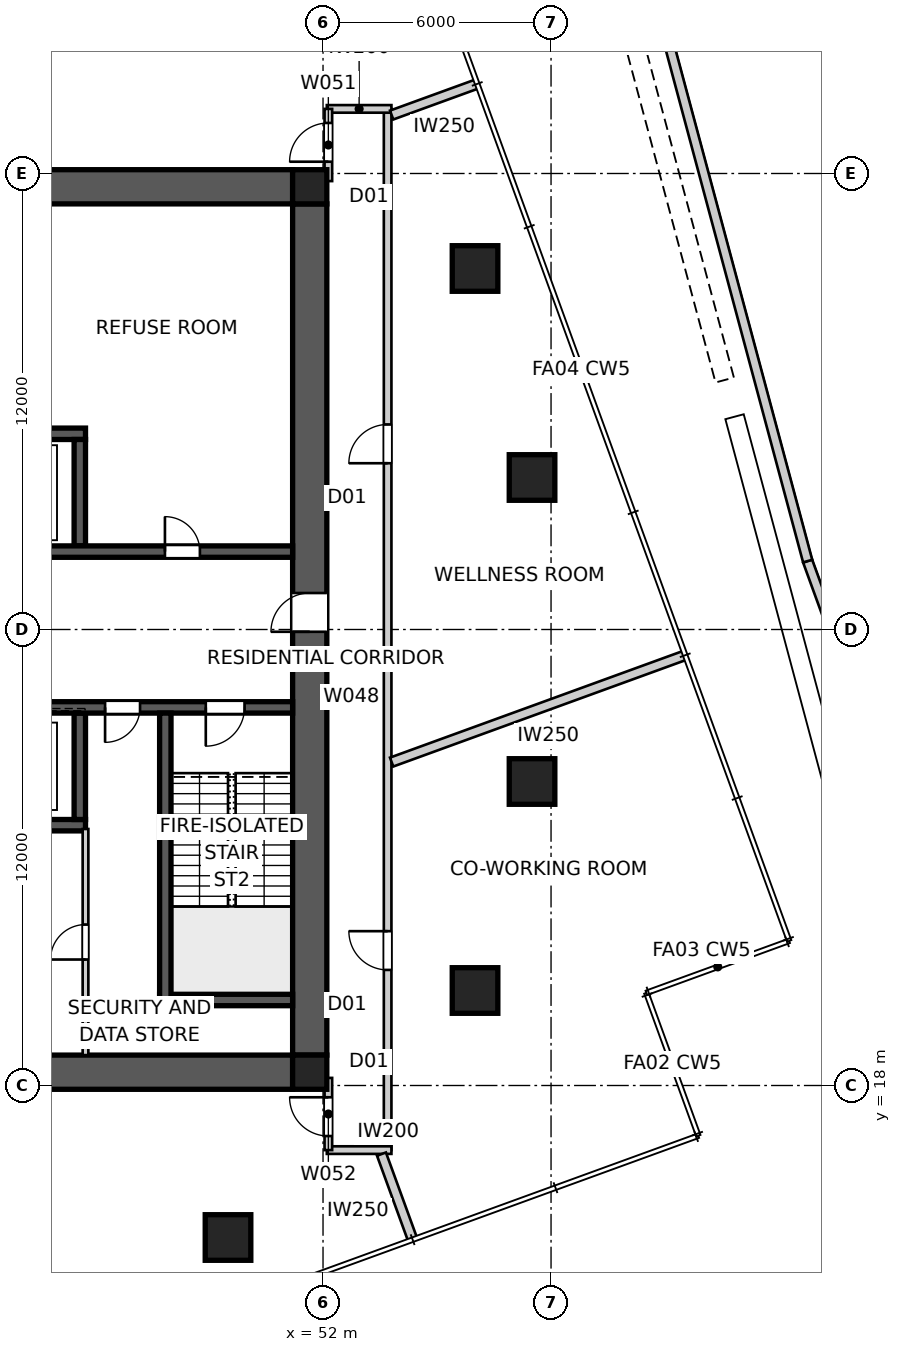
"""IFC4 building model, lengths in metres.
Left out: names, types, materials, properties, quantities, classifications, styles, units other than length and angle.
Written with IfcOpenShell. Run it as: python <this file> out.ifc"""

import sys

from ifc_helpers import new_model, si_unit, direction, frame, frame_2d, origin, origin_2d, place, context, subcontext, project, spatial, polyline, rectangle, outline, extrude, element, fill, save


model = new_model("IFC4")
c1 = context("Model", 3, precision=1e-05, world=origin(), true_north=direction((0.0, 1.0)))
c2 = subcontext(c1, "Body", "Model", "MODEL_VIEW")
j1 = project(units=[si_unit("LENGTHUNIT", "METRE"), si_unit("PLANEANGLEUNIT", "RADIAN")], contexts=[c1])
p1 = place(None, origin())
s1 = spatial("IfcSite", under=j1, at=p1, CompositionType="ELEMENT")
p2 = place(p1, origin())
s2 = spatial("IfcBuilding", under=s1, at=p2, CompositionType="ELEMENT")
p3 = place(p2, frame((0.0, 0.0, 138.8)))
s3 = spatial("IfcBuildingStorey", under=s2, at=p3, CompositionType="ELEMENT", Elevation=138.8)
for number, where, z_axis, x_axis in (
    (1, (28.8, 41.65, 0.0), (0.0, 0.0, 1.0), (1.0, 0.0, 0.0)),
    (2, (51.2, 18.35, 0.0), (0.0, 0.0, 1.0), (-1.0, 0.0, 0.0)),
):
    element("IfcWall", number, at=place(p3, frame(where, z_axis=z_axis, x_axis=x_axis)), inside=s3, PredefinedType="SHEAR", context=c2, shape_type="SweptSolid", body=[
        extrude(outline(polyline([(0.0, -0.45), (22.4, -0.45), (22.4, -0.025), (22.85, -0.025), (22.85, 0.025), (22.4, 0.025), (22.4, 0.45), (0.0, 0.45), (0.0, 0.025), (-0.45, 0.025), (-0.45, -0.025), (0.0, -0.025), (0.0, -0.45)])), origin(), (0.0, 0.0, 1.0), 5.0),
    ])
p4 = place(p3, frame((51.65, 18.8, 0.0), z_axis=(0.0, 0.0, 1.0), x_axis=(0.0, 1.0, 0.0)))
e3 = element("IfcWall", 3, at=p4, inside=s3, PredefinedType="SHEAR", context=c2, shape_type="SweptSolid", body=[
    extrude(outline(polyline([(0.0, -0.45), (22.4, -0.45), (22.4, -0.025), (22.85, -0.025), (22.85, 0.025), (22.4, 0.025), (22.4, 0.45), (0.0, 0.45), (0.0, 0.025), (-0.45, 0.025), (-0.45, -0.025), (0.0, -0.025), (0.0, -0.45)])), origin(), (0.0, 0.0, 1.0), 5.0),
])
p5 = place(p4, frame((11.14, 0.0, 0.0)))
e4 = element("IfcOpeningElement", 4, at=p5, cuts=e3, PredefinedType="OPENING", context=c2, shape_type="SweptSolid", body=[
    extrude(rectangle(XDim=1.02, YDim=2.4, at=frame_2d((0.51, 1.2))), frame((0.0, 0.46, 0.0), z_axis=(0.0, -1.0, 0.0), x_axis=(1.0, 0.0, 0.0)), (0.0, 0.0, 1.0), 0.92),
])
p6 = place(p3, frame((28.8, 32.05, 0.0), z_axis=(0.0, 0.0, 1.0), x_axis=(1.0, 0.0, 0.0)))
e5 = element("IfcWall", 5, at=p6, inside=s3, PredefinedType="SHEAR", context=c2, shape_type="SweptSolid", body=[
    extrude(rectangle(XDim=22.4, YDim=0.3, at=frame_2d((11.2, 0.0))), origin(), (0.0, 0.0, 1.0), 5.0),
])
p7 = place(p6, frame((19.04, 0.0, 0.0)))
e6 = element("IfcOpeningElement", 6, at=p7, cuts=e5, PredefinedType="OPENING", context=c2, shape_type="SweptSolid", body=[
    extrude(rectangle(XDim=0.92, YDim=2.1, at=frame_2d((0.46, 1.05))), frame((0.0, 0.16, 0.0), z_axis=(0.0, -1.0, 0.0), x_axis=(1.0, 0.0, 0.0)), (0.0, 0.0, 1.0), 0.32),
])
p8 = place(p6, frame((1.265, 0.0, 0.0)))
e7 = element("IfcOpeningElement", 7, at=p8, cuts=e5, PredefinedType="OPENING", context=c2, shape_type="SweptSolid", body=[
    extrude(rectangle(XDim=1.02, YDim=2.1, at=frame_2d((0.51, 1.05))), frame((0.0, 0.16, 0.0), z_axis=(0.0, -1.0, 0.0), x_axis=(1.0, 0.0, 0.0)), (0.0, 0.0, 1.0), 0.32),
])
p9 = place(p6, frame((4.015, 0.0, 0.0)))
e8 = element("IfcOpeningElement", 8, at=p9, cuts=e5, PredefinedType="OPENING", context=c2, shape_type="SweptSolid", body=[
    extrude(rectangle(XDim=0.92, YDim=2.1, at=frame_2d((0.46, 1.05))), frame((0.0, 0.16, 0.0), z_axis=(0.0, -1.0, 0.0), x_axis=(1.0, 0.0, 0.0)), (0.0, 0.0, 1.0), 0.32),
])
p10 = place(p6, frame((6.45, 0.0, 0.0)))
e9 = element("IfcOpeningElement", 9, at=p10, cuts=e5, PredefinedType="OPENING", context=c2, shape_type="SweptSolid", body=[
    extrude(rectangle(XDim=1.1, YDim=2.1, at=frame_2d((0.55, 1.05))), frame((0.0, 0.16, 0.0), z_axis=(0.0, -1.0, 0.0), x_axis=(1.0, 0.0, 0.0)), (0.0, 0.0, 1.0), 0.32),
])
p11 = place(p6, frame((9.25, 0.0, 0.0)))
e10 = element("IfcOpeningElement", 10, at=p11, cuts=e5, PredefinedType="OPENING", context=c2, shape_type="SweptSolid", body=[
    extrude(rectangle(XDim=1.1, YDim=2.1, at=frame_2d((0.55, 1.05))), frame((0.0, 0.16, 0.0), z_axis=(0.0, -1.0, 0.0), x_axis=(1.0, 0.0, 0.0)), (0.0, 0.0, 1.0), 0.32),
])
p12 = place(p6, frame((12.05, 0.0, 0.0)))
e11 = element("IfcOpeningElement", 11, at=p12, cuts=e5, PredefinedType="OPENING", context=c2, shape_type="SweptSolid", body=[
    extrude(rectangle(XDim=1.1, YDim=2.1, at=frame_2d((0.55, 1.05))), frame((0.0, 0.16, 0.0), z_axis=(0.0, -1.0, 0.0), x_axis=(1.0, 0.0, 0.0)), (0.0, 0.0, 1.0), 0.32),
])
p13 = place(p6, frame((14.85, 0.0, 0.0)))
e12 = element("IfcOpeningElement", 12, at=p13, cuts=e5, PredefinedType="OPENING", context=c2, shape_type="SweptSolid", body=[
    extrude(rectangle(XDim=1.1, YDim=2.1, at=frame_2d((0.55, 1.05))), frame((0.0, 0.16, 0.0), z_axis=(0.0, -1.0, 0.0), x_axis=(1.0, 0.0, 0.0)), (0.0, 0.0, 1.0), 0.32),
])
p14 = place(p3, frame((51.2, 27.95, 0.0), z_axis=(0.0, 0.0, 1.0), x_axis=(-1.0, 0.0, 0.0)))
e13 = element("IfcWall", 13, at=p14, inside=s3, PredefinedType="SHEAR", context=c2, shape_type="SweptSolid", body=[
    extrude(rectangle(XDim=22.4, YDim=0.3, at=frame_2d((11.2, 0.0))), origin(), (0.0, 0.0, 1.0), 5.0),
])
p15 = place(p14, frame((19.04, 0.0, 0.0)))
e14 = element("IfcOpeningElement", 14, at=p15, cuts=e13, PredefinedType="OPENING", context=c2, shape_type="SweptSolid", body=[
    extrude(rectangle(XDim=0.92, YDim=2.1, at=frame_2d((0.46, 1.05))), frame((0.0, 0.16, 0.0), z_axis=(0.0, -1.0, 0.0), x_axis=(1.0, 0.0, 0.0)), (0.0, 0.0, 1.0), 0.32),
])
p16 = place(p14, frame((1.265, 0.0, 0.0)))
e15 = element("IfcOpeningElement", 15, at=p16, cuts=e13, PredefinedType="OPENING", context=c2, shape_type="SweptSolid", body=[
    extrude(rectangle(XDim=1.02, YDim=2.1, at=frame_2d((0.51, 1.05))), frame((0.0, 0.16, 0.0), z_axis=(0.0, -1.0, 0.0), x_axis=(1.0, 0.0, 0.0)), (0.0, 0.0, 1.0), 0.32),
])
p17 = place(p14, frame((4.015, 0.0, 0.0)))
e16 = element("IfcOpeningElement", 16, at=p17, cuts=e13, PredefinedType="OPENING", context=c2, shape_type="SweptSolid", body=[
    extrude(rectangle(XDim=0.92, YDim=2.1, at=frame_2d((0.46, 1.05))), frame((0.0, 0.16, 0.0), z_axis=(0.0, -1.0, 0.0), x_axis=(1.0, 0.0, 0.0)), (0.0, 0.0, 1.0), 0.32),
])
p18 = place(p14, frame((6.45, 0.0, 0.0)))
e17 = element("IfcOpeningElement", 17, at=p18, cuts=e13, PredefinedType="OPENING", context=c2, shape_type="SweptSolid", body=[
    extrude(rectangle(XDim=1.1, YDim=2.1, at=frame_2d((0.55, 1.05))), frame((0.0, 0.16, 0.0), z_axis=(0.0, -1.0, 0.0), x_axis=(1.0, 0.0, 0.0)), (0.0, 0.0, 1.0), 0.32),
])
p19 = place(p14, frame((9.25, 0.0, 0.0)))
e18 = element("IfcOpeningElement", 18, at=p19, cuts=e13, PredefinedType="OPENING", context=c2, shape_type="SweptSolid", body=[
    extrude(rectangle(XDim=1.1, YDim=2.1, at=frame_2d((0.55, 1.05))), frame((0.0, 0.16, 0.0), z_axis=(0.0, -1.0, 0.0), x_axis=(1.0, 0.0, 0.0)), (0.0, 0.0, 1.0), 0.32),
])
p20 = place(p14, frame((12.05, 0.0, 0.0)))
e19 = element("IfcOpeningElement", 19, at=p20, cuts=e13, PredefinedType="OPENING", context=c2, shape_type="SweptSolid", body=[
    extrude(rectangle(XDim=1.1, YDim=2.1, at=frame_2d((0.55, 1.05))), frame((0.0, 0.16, 0.0), z_axis=(0.0, -1.0, 0.0), x_axis=(1.0, 0.0, 0.0)), (0.0, 0.0, 1.0), 0.32),
])
p21 = place(p14, frame((14.85, 0.0, 0.0)))
e20 = element("IfcOpeningElement", 20, at=p21, cuts=e13, PredefinedType="OPENING", context=c2, shape_type="SweptSolid", body=[
    extrude(rectangle(XDim=1.1, YDim=2.1, at=frame_2d((0.55, 1.05))), frame((0.0, 0.16, 0.0), z_axis=(0.0, -1.0, 0.0), x_axis=(1.0, 0.0, 0.0)), (0.0, 0.0, 1.0), 0.32),
])
for number, where, z_axis, x_axis in (
    (21, (34.25, 35.15, 0.0), (0.0, 0.0, 1.0), (1.0, 0.0, 0.0)),
    (22, (45.75, 24.85, 0.0), (0.0, 0.0, 1.0), (-1.0, 0.0, 0.0)),
):
    element("IfcWall", number, at=place(p3, frame(where, z_axis=z_axis, x_axis=x_axis)), inside=s3, PredefinedType="SHEAR", context=c2, shape_type="SweptSolid", body=[
        extrude(rectangle(XDim=11.5, YDim=0.3, at=frame_2d((5.75, 0.0))), origin(), (0.0, 0.0, 1.0), 5.0),
    ])
for number, where, z_axis, x_axis in (
    (23, (45.6, 27.8, 0.0), (0.0, 0.0, 1.0), (0.0, -1.0, 0.0)),
    (24, (45.6, 32.2, 0.0), (0.0, 0.0, 1.0), (0.0, 1.0, 0.0)),
):
    element("IfcWall", number, at=place(p3, frame(where, z_axis=z_axis, x_axis=x_axis)), inside=s3, PredefinedType="SHEAR", context=c2, shape_type="SweptSolid", body=[
        extrude(rectangle(XDim=2.8, YDim=0.3, at=frame_2d((1.4, 0.0))), origin(), (0.0, 0.0, 1.0), 5.0),
    ])
p22 = place(p3, frame((47.85, 27.8, 0.0), z_axis=(0.0, 0.0, 1.0), x_axis=(0.0, -1.0, 0.0)))
e25 = element("IfcWall", 25, at=p22, inside=s3, PredefinedType="SHEAR", context=c2, shape_type="SweptSolid", body=[
    extrude(rectangle(XDim=7.7, YDim=0.3, at=frame_2d((3.85, 0.0))), origin(), (0.0, 0.0, 1.0), 5.0),
])
p23 = place(p3, frame((51.2, 20.25, 0.0), z_axis=(0.0, 0.0, 1.0), x_axis=(-1.0, 0.0, 0.0)))
e26 = element("IfcWall", 26, at=p23, inside=s3, PredefinedType="SHEAR", context=c2, shape_type="SweptSolid", body=[
    extrude(rectangle(XDim=3.5, YDim=0.3, at=frame_2d((1.75, 0.0))), origin(), (0.0, 0.0, 1.0), 5.0),
])
for number, where, z_axis, x_axis in (
    (27, (51.65, 18.35, 0.0), (0.0, 0.0, 1.0), (1.0, 0.0, 0.0)),
    (28, (51.65, 41.65, 0.0), (0.0, 0.0, 1.0), (1.0, 0.0, 0.0)),
):
    element("IfcColumn", number, at=place(p3, frame(where, z_axis=z_axis, x_axis=x_axis)), inside=s3, PredefinedType="COLUMN", context=c2, shape_type="SweptSolid", body=[
        extrude(rectangle(XDim=0.9, YDim=0.9, at=origin_2d()), origin(), (0.0, 0.0, 1.0), 5.0),
    ])
for number, where, z_axis, x_axis in (
    (29, (57.5, 26.0, 0.0), (0.0, 0.0, 1.0), (1.0, 0.0, 0.0)),
    (30, (57.5, 34.0, 0.0), (0.0, 0.0, 1.0), (1.0, 0.0, 0.0)),
    (31, (56.0, 39.5, 0.0), (0.0, 0.0, 1.0), (1.0, 0.0, 0.0)),
    (32, (49.5, 14.0, 0.0), (0.0, 0.0, 1.0), (1.0, 0.0, 0.0)),
    (33, (56.0, 20.5, 0.0), (0.0, 0.0, 1.0), (1.0, 0.0, 0.0)),
):
    element("IfcColumn", number, at=place(p3, frame(where, z_axis=z_axis, x_axis=x_axis)), inside=s3, PredefinedType="COLUMN", context=c2, shape_type="SweptSolid", body=[
        extrude(rectangle(XDim=1.2, YDim=1.2, at=origin_2d()), origin(), (0.0, 0.0, 1.0), 5.0),
    ])
p24 = place(p3, frame((69.276, 19.372, -0.05), z_axis=(0.0, 0.0, 1.0), x_axis=(-0.342020197341, 0.939692601126, 0.0)))
e34 = element("IfcWall", 34, at=p24, inside=s3, PredefinedType="PARAPET", context=c2, shape_type="SweptSolid", body=[
    extrude(rectangle(XDim=13.226, YDim=0.25, at=frame_2d((6.613, 0.0))), origin(), (0.0, 0.0, 1.0), 1.15),
])
p25 = place(p3, frame((64.752, 31.801, -0.05), z_axis=(0.0, 0.0, 1.0), x_axis=(-0.258820599944, 0.965925409669, 0.0)))
e35 = element("IfcWall", 35, at=p25, inside=s3, PredefinedType="PARAPET", context=c2, shape_type="SweptSolid", body=[
    extrude(rectangle(XDim=29.167, YDim=0.25, at=frame_2d((14.583, 0.0))), origin(), (0.0, 0.0, 1.0), 1.15),
])
p26 = place(p3, frame((53.7, 16.3, 0.0), z_axis=(0.0, 0.0, 1.0), x_axis=(0.0, 1.0, 0.0)))
e36 = element("IfcWall", 36, at=p26, inside=s3, PredefinedType="PARTITIONING", context=c2, shape_type="SweptSolid", body=[
    extrude(rectangle(XDim=27.4, YDim=0.2, at=frame_2d((13.7, 0.0))), origin(), (0.0, 0.0, 1.0), 4.85),
])
p27 = place(p26, frame((18.075, 0.0, 0.0)))
e37 = element("IfcOpeningElement", 37, at=p27, cuts=e36, PredefinedType="OPENING", context=c2, shape_type="SweptSolid", body=[
    extrude(rectangle(XDim=1.02, YDim=2.34, at=frame_2d((0.51, 1.17))), frame((0.0, 0.11, 0.0), z_axis=(0.0, -1.0, 0.0), x_axis=(1.0, 0.0, 0.0)), (0.0, 0.0, 1.0), 0.22),
])
p28 = place(p26, frame((4.741, 0.0, 0.0)))
e38 = element("IfcOpeningElement", 38, at=p28, cuts=e36, PredefinedType="OPENING", context=c2, shape_type="SweptSolid", body=[
    extrude(rectangle(XDim=1.02, YDim=2.34, at=frame_2d((0.51, 1.17))), frame((0.0, 0.11, 0.0), z_axis=(0.0, -1.0, 0.0), x_axis=(1.0, 0.0, 0.0)), (0.0, 0.0, 1.0), 0.22),
])
for number, where, z_axis, x_axis in (
    (39, (52.1, 43.7, 0.0), (0.0, 0.0, 1.0), (1.0, 0.0, 0.0)),
    (40, (52.1, 16.3, 0.0), (0.0, 0.0, 1.0), (1.0, 0.0, 0.0)),
):
    element("IfcWall", number, at=place(p3, frame(where, z_axis=z_axis, x_axis=x_axis)), inside=s3, PredefinedType="PARTITIONING", context=c2, shape_type="SweptSolid", body=[
        extrude(rectangle(XDim=1.7, YDim=0.2, at=frame_2d((0.85, 0.0))), origin(), (0.0, 0.0, 1.0), 4.85),
    ])
p29 = place(p3, frame((52.14, 41.8, 0.0), z_axis=(0.0, 0.0, 1.0), x_axis=(0.0, 1.0, 0.0)))
e41 = element("IfcWall", 41, at=p29, inside=s3, PredefinedType="PARTITIONING", context=c2, shape_type="SweptSolid", body=[
    extrude(rectangle(XDim=1.9, YDim=0.2, at=frame_2d((0.95, 0.0))), origin(), (0.0, 0.0, 1.0), 4.85),
])
p30 = place(p29, frame((0.51, 0.0, 0.0)))
e42 = element("IfcOpeningElement", 42, at=p30, cuts=e41, PredefinedType="OPENING", context=c2, shape_type="SweptSolid", body=[
    extrude(rectangle(XDim=1.02, YDim=2.34, at=frame_2d((0.51, 1.17))), frame((0.0, 0.11, 0.0), z_axis=(0.0, -1.0, 0.0), x_axis=(1.0, 0.0, 0.0)), (0.0, 0.0, 1.0), 0.22),
])
p31 = place(p3, frame((52.14, 16.3, 0.0), z_axis=(0.0, 0.0, 1.0), x_axis=(0.0, 1.0, 0.0)))
e43 = element("IfcWall", 43, at=p31, inside=s3, PredefinedType="PARTITIONING", context=c2, shape_type="SweptSolid", body=[
    extrude(rectangle(XDim=1.9, YDim=0.2, at=frame_2d((0.95, 0.0))), origin(), (0.0, 0.0, 1.0), 4.85),
])
p32 = place(p31, frame((0.37, 0.0, 0.0)))
e44 = element("IfcOpeningElement", 44, at=p32, cuts=e43, PredefinedType="OPENING", context=c2, shape_type="SweptSolid", body=[
    extrude(rectangle(XDim=1.02, YDim=2.34, at=frame_2d((0.51, 1.17))), frame((0.0, 0.11, 0.0), z_axis=(0.0, -1.0, 0.0), x_axis=(1.0, 0.0, 0.0)), (0.0, 0.0, 1.0), 0.22),
])
p33 = place(p3, frame((54.358, 13.942, 0.0), z_axis=(0.0, 0.0, 1.0), x_axis=(-0.342021098348, 0.939692273186, 0.0)))
e45 = element("IfcWall", 45, at=p33, inside=s3, PredefinedType="PARTITIONING", context=c2, shape_type="SweptSolid", body=[
    extrude(rectangle(XDim=2.397, YDim=0.25, at=frame_2d((1.198, 0.0))), origin(), (0.0, 0.0, 1.0), 4.85),
])
p34 = place(p3, frame((61.53, 29.323, 0.0), z_axis=(0.0, 0.0, 1.0), x_axis=(-0.939696268654, -0.342010120724, 0.0)))
e46 = element("IfcWall", 46, at=p34, inside=s3, PredefinedType="PARTITIONING", context=c2, shape_type="SweptSolid", body=[
    extrude(rectangle(XDim=8.221, YDim=0.25, at=frame_2d((4.11, 0.0))), origin(), (0.0, 0.0, 1.0), 4.85),
])
p35 = place(p3, frame((56.058, 44.358, 0.0), z_axis=(0.0, 0.0, 1.0), x_axis=(-0.939692273186, -0.342021098348, 0.0)))
e47 = element("IfcWall", 47, at=p35, inside=s3, PredefinedType="PARTITIONING", context=c2, shape_type="SweptSolid", body=[
    extrude(rectangle(XDim=2.397, YDim=0.25, at=frame_2d((1.198, 0.0))), origin(), (0.0, 0.0, 1.0), 4.85),
])
p36 = place(p3, frame((45.75, 18.8, 0.0), z_axis=(0.0, 0.0, 1.0), x_axis=(0.0, 1.0, 0.0)))
e48 = element("IfcWall", 48, at=p36, inside=s3, PredefinedType="SOLIDWALL", context=c2, shape_type="SweptSolid", body=[
    extrude(rectangle(XDim=5.95, YDim=0.15, at=frame_2d((2.975, 0.0))), origin(), (0.0, 0.0, 1.0), 4.85),
])
p37 = place(p36, frame((2.515, 0.0, 0.0)))
e49 = element("IfcOpeningElement", 49, at=p37, cuts=e48, PredefinedType="OPENING", context=c2, shape_type="SweptSolid", body=[
    extrude(rectangle(XDim=0.92, YDim=2.1, at=frame_2d((0.46, 1.05))), frame((0.0, 0.085, 0.0), z_axis=(0.0, -1.0, 0.0), x_axis=(1.0, 0.0, 0.0)), (0.0, 0.0, 1.0), 0.17),
])
p38 = place(p7, origin())
e50 = element("IfcDoor", 50, at=p38, inside=s3, OperationType="SINGLE_SWING_LEFT", PredefinedType="DOOR", context=c2, shape_type="SweptSolid", body=[
    extrude(rectangle(XDim=0.92, YDim=2.1, at=frame_2d((0.46, 1.05))), frame((0.0, 0.025, 0.0), z_axis=(0.0, -1.0, 0.0), x_axis=(1.0, 0.0, 0.0)), (0.0, 0.0, 1.0), 0.05),
])
fill(e6, e50)
p39 = place(p16, origin())
e51 = element("IfcDoor", 51, at=p39, inside=s3, OperationType="SINGLE_SWING_RIGHT", PredefinedType="DOOR", context=c2, shape_type="SweptSolid", body=[
    extrude(rectangle(XDim=1.02, YDim=2.1, at=frame_2d((0.51, 1.05))), frame((0.0, 0.025, 0.0), z_axis=(0.0, -1.0, 0.0), x_axis=(1.0, 0.0, 0.0)), (0.0, 0.0, 1.0), 0.05),
])
fill(e15, e51)
p40 = place(p17, origin())
e52 = element("IfcDoor", 52, at=p40, inside=s3, OperationType="SINGLE_SWING_RIGHT", PredefinedType="DOOR", context=c2, shape_type="SweptSolid", body=[
    extrude(rectangle(XDim=0.92, YDim=2.1, at=frame_2d((0.46, 1.05))), frame((0.0, 0.025, 0.0), z_axis=(0.0, -1.0, 0.0), x_axis=(1.0, 0.0, 0.0)), (0.0, 0.0, 1.0), 0.05),
])
fill(e16, e52)
p41 = place(p27, origin())
e53 = element("IfcDoor", 53, at=p41, inside=s3, OperationType="SINGLE_SWING_LEFT", PredefinedType="DOOR", context=c2, shape_type="SweptSolid", body=[
    extrude(rectangle(XDim=1.02, YDim=2.34, at=frame_2d((0.51, 1.17))), frame((0.0, 0.025, 0.0), z_axis=(0.0, -1.0, 0.0), x_axis=(1.0, 0.0, 0.0)), (0.0, 0.0, 1.0), 0.05),
])
fill(e37, e53)
p42 = place(p28, origin())
e54 = element("IfcDoor", 54, at=p42, inside=s3, OperationType="SINGLE_SWING_RIGHT", PredefinedType="DOOR", context=c2, shape_type="SweptSolid", body=[
    extrude(rectangle(XDim=1.02, YDim=2.34, at=frame_2d((0.51, 1.17))), frame((0.0, 0.025, 0.0), z_axis=(0.0, -1.0, 0.0), x_axis=(1.0, 0.0, 0.0)), (0.0, 0.0, 1.0), 0.05),
])
fill(e38, e54)
p43 = place(p32, origin())
e55 = element("IfcDoor", 55, at=p43, inside=s3, OperationType="SINGLE_SWING_RIGHT", PredefinedType="DOOR", context=c2, shape_type="SweptSolid", body=[
    extrude(rectangle(XDim=1.02, YDim=2.34, at=frame_2d((0.51, 1.17))), frame((0.0, 0.025, 0.0), z_axis=(0.0, -1.0, 0.0), x_axis=(1.0, 0.0, 0.0)), (0.0, 0.0, 1.0), 0.05),
])
fill(e44, e55)
p44 = place(p30, origin())
e56 = element("IfcDoor", 56, at=p44, inside=s3, OperationType="SINGLE_SWING_LEFT", PredefinedType="DOOR", context=c2, shape_type="SweptSolid", body=[
    extrude(rectangle(XDim=1.02, YDim=2.34, at=frame_2d((0.51, 1.17))), frame((0.0, 0.025, 0.0), z_axis=(0.0, -1.0, 0.0), x_axis=(1.0, 0.0, 0.0)), (0.0, 0.0, 1.0), 0.05),
])
fill(e42, e56)
p45 = place(p37, origin())
e57 = element("IfcDoor", 57, at=p45, inside=s3, OperationType="SINGLE_SWING_LEFT", PredefinedType="DOOR", context=c2, shape_type="SweptSolid", body=[
    extrude(rectangle(XDim=0.92, YDim=2.1, at=frame_2d((0.46, 1.05))), frame((0.0, 0.025, 0.0), z_axis=(0.0, -1.0, 0.0), x_axis=(1.0, 0.0, 0.0)), (0.0, 0.0, 1.0), 0.05),
])
fill(e49, e57)
p46 = place(p5, origin())
e58 = element("IfcDoor", 58, at=p46, inside=s3, OperationType="SINGLE_SWING_LEFT", PredefinedType="DOOR", context=c2, shape_type="SweptSolid", body=[
    extrude(rectangle(XDim=1.02, YDim=2.4, at=frame_2d((0.51, 1.2))), frame((0.0, 0.025, 0.0), z_axis=(0.0, -1.0, 0.0), x_axis=(1.0, 0.0, 0.0)), (0.0, 0.0, 1.0), 0.05),
])
fill(e4, e58)
save(model, sys.argv[1])
